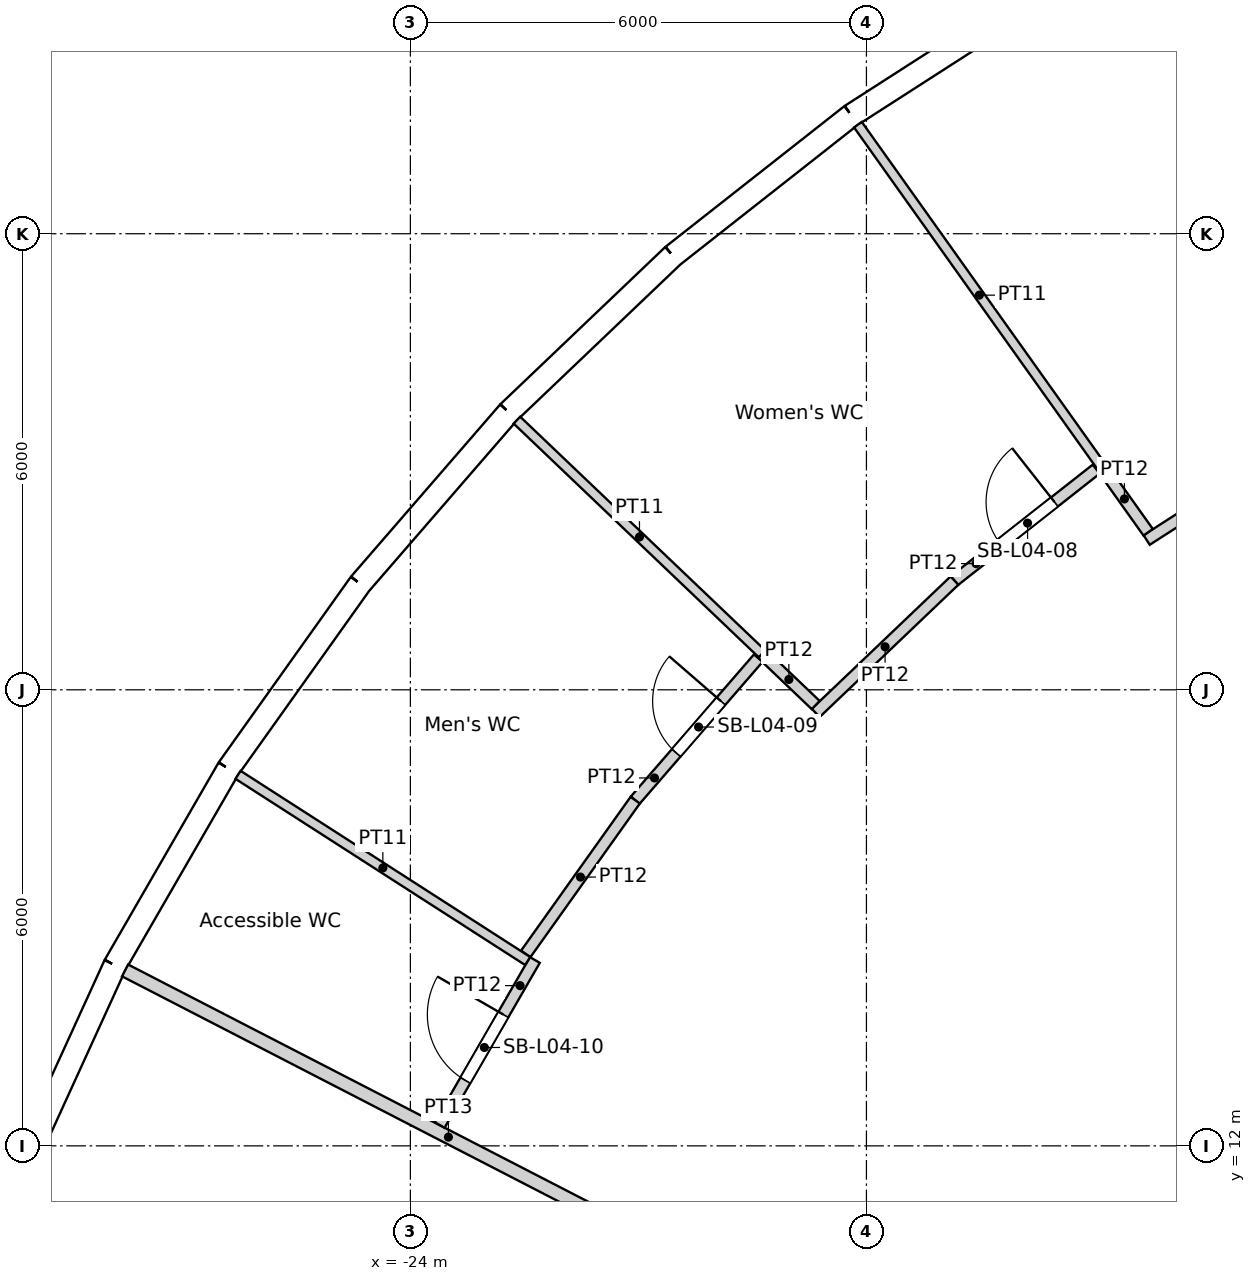
"""IFC4 building model, lengths in metres.
Left out: names, types, materials, properties, quantities, classifications, styles, units other than length and angle.
Written with IfcOpenShell. Run it as: python <this file> out.ifc"""

import sys

from ifc_helpers import new_model, si_unit, direction, frame, frame_2d, origin, origin_2d, place, context, subcontext, project, spatial, rectangle, circle, extrude, element, fill, save


model = new_model("IFC4")
c1 = context("Model", 3, precision=1e-05, world=origin(), true_north=direction((0.0, 1.0)))
c2 = subcontext(c1, "Body", "Model", "MODEL_VIEW")
j1 = project(units=[si_unit("LENGTHUNIT", "METRE"), si_unit("PLANEANGLEUNIT", "RADIAN")], contexts=[c1])
p1 = place(None, origin())
s1 = spatial("IfcSite", under=j1, at=p1, CompositionType="ELEMENT")
p2 = place(p1, origin())
s2 = spatial("IfcBuilding", under=s1, at=p2, CompositionType="ELEMENT")
p3 = place(p2, frame((0.0, 0.0, 23.4)))
s3 = spatial("IfcBuildingStorey", under=s2, at=p3, CompositionType="ELEMENT", Elevation=23.4)
for number, where, z_axis, x_axis in (
    (1, (-15.137, 26.219, 0.0), (0.0, 0.0, 1.0), (1.0, 0.0, 0.0)),
    (2, (-19.826, 22.88, 0.0), (0.0, 0.0, 1.0), (1.0, 0.0, 0.0)),
    (3, (-23.797, 18.715, 0.0), (0.0, 0.0, 1.0), (1.0, 0.0, 0.0)),
    (4, (-26.909, 13.873, 0.0), (0.0, 0.0, 1.0), (1.0, 0.0, 0.0)),
):
    element("IfcColumn", number, at=place(p3, frame(where, z_axis=z_axis, x_axis=x_axis)), inside=s3, PredefinedType="COLUMN", context=c2, shape_type="SweptSolid", body=[
        extrude(circle(Radius=0.7, at=origin_2d()), origin(), (0.0, 0.0, 1.0), 4.8),
    ])
for number, where, z_axis, x_axis in (
    (5, (-16.846, 17.855, 0.0), (0.0, 0.0, 1.0), (1.0, 0.0, 0.0)),
    (6, (-20.509, 13.489, 0.0), (0.0, 0.0, 1.0), (1.0, 0.0, 0.0)),
):
    element("IfcColumn", number, at=place(p3, frame(where, z_axis=z_axis, x_axis=x_axis)), inside=s3, PredefinedType="COLUMN", context=c2, shape_type="SweptSolid", body=[
        extrude(circle(Radius=0.75, at=origin_2d()), origin(), (0.0, 0.0, 1.0), 4.8),
    ])
p4 = place(p3, frame((-13.798, 12.802, 0.0), z_axis=(0.0, 0.0, 1.0), x_axis=(1.0, 0.0, 0.0)))
e7 = element("IfcColumn", 7, at=p4, inside=s3, PredefinedType="COLUMN", context=c2, shape_type="SweptSolid", body=[
    extrude(circle(Radius=0.8, at=origin_2d()), origin(), (0.0, 0.0, 1.0), 4.8),
])
p5 = place(p3, frame((-15.687, 27.171, 0.0), z_axis=(0.0, 0.0, 1.0), x_axis=(-0.841242231846, -0.540658401727, 0.0)))
e8 = element("IfcWall", 8, at=p5, inside=s3, PredefinedType="SOLIDWALL", context=c2, shape_type="SweptSolid", body=[
    extrude(rectangle(XDim=2.986, YDim=0.3, at=frame_2d((1.493, 0.0))), origin(), (0.0, 0.0, 1.0), 4.35),
])
p6 = place(p5, frame((1.493, 0.0, 2.0)))
e9 = element("IfcOpeningElement", 9, at=p6, cuts=e8, PredefinedType="OPENING", context=c2, shape_type="SweptSolid", body=[
    extrude(circle(Radius=1.2, at=origin_2d()), frame((0.0, 0.16, 0.0), z_axis=(0.0, -1.0, 0.0), x_axis=(1.0, 0.0, 0.0)), (0.0, 0.0, 1.0), 0.32),
])
p7 = place(p3, frame((-18.199, 25.557, 0.0), z_axis=(0.0, 0.0, 1.0), x_axis=(-0.786043032847, -0.618171780747, 0.0)))
e10 = element("IfcWall", 10, at=p7, inside=s3, PredefinedType="SOLIDWALL", context=c2, shape_type="SweptSolid", body=[
    extrude(rectangle(XDim=2.986, YDim=0.3, at=frame_2d((1.493, 0.0))), origin(), (0.0, 0.0, 1.0), 4.35),
])
p8 = place(p7, frame((1.493, 0.0, 2.0)))
e11 = element("IfcOpeningElement", 11, at=p8, cuts=e10, PredefinedType="OPENING", context=c2, shape_type="SweptSolid", body=[
    extrude(circle(Radius=1.2, at=origin_2d()), frame((0.0, 0.16, 0.0), z_axis=(0.0, -1.0, 0.0), x_axis=(1.0, 0.0, 0.0)), (0.0, 0.0, 1.0), 0.32),
])
p9 = place(p3, frame((-20.546, 23.711, 0.0), z_axis=(0.0, 0.0, 1.0), x_axis=(-0.723750841228, -0.690061388444, 0.0)))
e12 = element("IfcWall", 12, at=p9, inside=s3, PredefinedType="SOLIDWALL", context=c2, shape_type="SweptSolid", body=[
    extrude(rectangle(XDim=2.986, YDim=0.3, at=frame_2d((1.493, 0.0))), origin(), (0.0, 0.0, 1.0), 3.85),
])
p10 = place(p9, frame((1.493, 0.0, 2.0)))
e13 = element("IfcOpeningElement", 13, at=p10, cuts=e12, PredefinedType="OPENING", context=c2, shape_type="SweptSolid", body=[
    extrude(circle(Radius=1.2, at=origin_2d()), frame((0.0, 0.16, 0.0), z_axis=(0.0, -1.0, 0.0), x_axis=(1.0, 0.0, 0.0)), (0.0, 0.0, 1.0), 0.32),
])
p11 = place(p3, frame((-22.707, 21.651, 0.0), z_axis=(0.0, 0.0, 1.0), x_axis=(-0.654809121128, -0.755794294029, 0.0)))
e14 = element("IfcWall", 14, at=p11, inside=s3, PredefinedType="SOLIDWALL", context=c2, shape_type="SweptSolid", body=[
    extrude(rectangle(XDim=2.986, YDim=0.3, at=frame_2d((1.493, 0.0))), origin(), (0.0, 0.0, 1.0), 4.35),
])
p12 = place(p11, frame((1.493, 0.0, 2.0)))
e15 = element("IfcOpeningElement", 15, at=p12, cuts=e14, PredefinedType="OPENING", context=c2, shape_type="SweptSolid", body=[
    extrude(circle(Radius=1.2, at=origin_2d()), frame((0.0, 0.16, 0.0), z_axis=(0.0, -1.0, 0.0), x_axis=(1.0, 0.0, 0.0)), (0.0, 0.0, 1.0), 0.32),
])
p13 = place(p3, frame((-24.662, 19.394, 0.0), z_axis=(0.0, 0.0, 1.0), x_axis=(-0.580100533892, -0.814544885551, 0.0)))
e16 = element("IfcWall", 16, at=p13, inside=s3, PredefinedType="SOLIDWALL", context=c2, shape_type="SweptSolid", body=[
    extrude(rectangle(XDim=2.986, YDim=0.3, at=frame_2d((1.493, 0.0))), origin(), (0.0, 0.0, 1.0), 4.35),
])
p14 = place(p13, frame((1.493, 0.0, 2.0)))
e17 = element("IfcOpeningElement", 17, at=p14, cuts=e16, PredefinedType="OPENING", context=c2, shape_type="SweptSolid", body=[
    extrude(circle(Radius=1.2, at=origin_2d()), frame((0.0, 0.16, 0.0), z_axis=(0.0, -1.0, 0.0), x_axis=(1.0, 0.0, 0.0)), (0.0, 0.0, 1.0), 0.32),
])
p15 = place(p3, frame((-26.394, 16.962, 0.0), z_axis=(0.0, 0.0, 1.0), x_axis=(-0.500017373705, -0.866015372839, 0.0)))
e18 = element("IfcWall", 18, at=p15, inside=s3, PredefinedType="SOLIDWALL", context=c2, shape_type="SweptSolid", body=[
    extrude(rectangle(XDim=2.986, YDim=0.3, at=frame_2d((1.493, 0.0))), origin(), (0.0, 0.0, 1.0), 3.85),
])
p16 = place(p15, frame((1.493, 0.0, 2.0)))
e19 = element("IfcOpeningElement", 19, at=p16, cuts=e18, PredefinedType="OPENING", context=c2, shape_type="SweptSolid", body=[
    extrude(circle(Radius=1.2, at=origin_2d()), frame((0.0, 0.16, 0.0), z_axis=(0.0, -1.0, 0.0), x_axis=(1.0, 0.0, 0.0)), (0.0, 0.0, 1.0), 0.32),
])
p17 = place(p3, frame((-27.887, 14.377, 0.0), z_axis=(0.0, 0.0, 1.0), x_axis=(-0.415373250944, -0.909651066289, 0.0)))
e20 = element("IfcWall", 20, at=p17, inside=s3, PredefinedType="SOLIDWALL", context=c2, shape_type="SweptSolid", body=[
    extrude(rectangle(XDim=2.986, YDim=0.3, at=frame_2d((1.493, 0.0))), origin(), (0.0, 0.0, 1.0), 4.35),
])
p18 = place(p17, frame((1.493, 0.0, 2.0)))
e21 = element("IfcOpeningElement", 21, at=p18, cuts=e20, PredefinedType="OPENING", context=c2, shape_type="SweptSolid", body=[
    extrude(circle(Radius=1.2, at=origin_2d()), frame((0.0, 0.16, 0.0), z_axis=(0.0, -1.0, 0.0), x_axis=(1.0, 0.0, 0.0)), (0.0, 0.0, 1.0), 0.32),
])
p19 = place(p3, frame((-27.753, 14.308, 0.0), z_axis=(0.0, 0.0, 1.0), x_axis=(0.888834171956, -0.458228998169, 0.0)))
e22 = element("IfcWall", 22, at=p19, inside=s3, PredefinedType="PARTITIONING", context=c2, shape_type="SweptSolid", body=[
    extrude(rectangle(XDim=9.572, YDim=0.175, at=frame_2d((4.786, 0.0))), origin(), (0.0, 0.0, 1.0), 3.75),
])
p20 = place(p3, frame((-26.268, 16.881, 0.0), z_axis=(0.0, 0.0, 1.0), x_axis=(0.841252009565, -0.540643187697, 0.0)))
e23 = element("IfcWall", 23, at=p20, inside=s3, PredefinedType="PARTITIONING", context=c2, shape_type="SweptSolid", body=[
    extrude(rectangle(XDim=4.53, YDim=0.125, at=frame_2d((2.265, 0.0))), origin(), (0.0, 0.0, 1.0), 3.75),
])
p21 = place(p3, frame((-22.598, 21.547, 0.0), z_axis=(0.0, 0.0, 1.0), x_axis=(0.723757276148, -0.690054639302, 0.0)))
e24 = element("IfcWall", 24, at=p21, inside=s3, PredefinedType="PARTITIONING", context=c2, shape_type="SweptSolid", body=[
    extrude(rectangle(XDim=4.455, YDim=0.125, at=frame_2d((2.228, 0.0))), origin(), (0.0, 0.0, 1.0), 3.75),
])
p22 = place(p3, frame((-23.615, 12.275, 0.0), z_axis=(0.0, 0.0, 1.0), x_axis=(0.499952953824, 0.866052564203, 0.0)))
e25 = element("IfcWall", 25, at=p22, inside=s3, PredefinedType="PARTITIONING", context=c2, shape_type="SweptSolid", body=[
    extrude(rectangle(XDim=2.506, YDim=0.15, at=frame_2d((1.253, 0.0))), origin(), (0.0, 0.0, 1.0), 3.75),
])
p23 = place(p22, frame((0.677, 0.0, 0.0)))
e26 = element("IfcOpeningElement", 26, at=p23, cuts=e25, PredefinedType="OPENING", context=c2, shape_type="SweptSolid", body=[
    extrude(rectangle(XDim=1.0, YDim=2.1, at=frame_2d((0.5, 1.05))), frame((0.0, 0.075, 0.0), z_axis=(0.0, -1.0, 0.0), x_axis=(1.0, 0.0, 0.0)), (0.0, 0.0, 1.0), 0.15),
])
p24 = place(p3, frame((-21.042, 16.548, 0.0), z_axis=(0.0, 0.0, 1.0), x_axis=(-0.58007505892, -0.814563027653, 0.0)))
e27 = element("IfcWall", 27, at=p24, inside=s3, PredefinedType="PARTITIONING", context=c2, shape_type="SweptSolid", body=[
    extrude(rectangle(XDim=2.483, YDim=0.15, at=frame_2d((1.242, 0.0))), origin(), (0.0, 0.0, 1.0), 3.75),
])
p25 = place(p3, frame((-21.042, 16.548, 0.0), z_axis=(0.0, 0.0, 1.0), x_axis=(0.654791429376, 0.755809621542, 0.0)))
e28 = element("IfcWall", 28, at=p25, inside=s3, PredefinedType="PARTITIONING", context=c2, shape_type="SweptSolid", body=[
    extrude(rectangle(XDim=2.472, YDim=0.15, at=frame_2d((1.236, 0.0))), origin(), (0.0, 0.0, 1.0), 3.75),
])
p26 = place(p25, frame((0.824, 0.0, 0.0)))
e29 = element("IfcOpeningElement", 29, at=p26, cuts=e28, PredefinedType="OPENING", context=c2, shape_type="SweptSolid", body=[
    extrude(rectangle(XDim=0.9, YDim=2.1, at=frame_2d((0.45, 1.05))), frame((0.0, 0.075, 0.0), z_axis=(0.0, -1.0, 0.0), x_axis=(1.0, 0.0, 0.0)), (0.0, 0.0, 1.0), 0.15),
])
p27 = place(p3, frame((-19.374, 18.473, 0.0), z_axis=(0.0, 0.0, 1.0), x_axis=(0.723786925296, -0.690023540737, 0.0)))
e30 = element("IfcWall", 30, at=p27, inside=s3, PredefinedType="PARTITIONING", context=c2, shape_type="SweptSolid", body=[
    extrude(rectangle(XDim=0.976, YDim=0.15, at=frame_2d((0.488, 0.0))), origin(), (0.0, 0.0, 1.0), 3.75),
])
p28 = place(p3, frame((-18.112, 25.435, 0.0), z_axis=(0.0, 0.0, 1.0), x_axis=(0.580038022369, -0.814589401236, 0.0)))
e31 = element("IfcWall", 31, at=p28, inside=s3, PredefinedType="PARTITIONING", context=c2, shape_type="SweptSolid", body=[
    extrude(rectangle(XDim=5.506, YDim=0.125, at=frame_2d((2.753, 0.0))), origin(), (0.0, 0.0, 1.0), 3.75),
])
p29 = place(p3, frame((-16.842, 19.436, 0.0), z_axis=(0.0, 0.0, 1.0), x_axis=(-0.723748787545, -0.690063542384, 0.0)))
e32 = element("IfcWall", 32, at=p29, inside=s3, PredefinedType="PARTITIONING", context=c2, shape_type="SweptSolid", body=[
    extrude(rectangle(XDim=2.522, YDim=0.15, at=frame_2d((1.261, 0.0))), origin(), (0.0, 0.0, 1.0), 3.75),
])
p30 = place(p3, frame((-16.842, 19.436, 0.0), z_axis=(0.0, 0.0, 1.0), x_axis=(0.786071894696, 0.618135079387, 0.0)))
e33 = element("IfcWall", 33, at=p30, inside=s3, PredefinedType="PARTITIONING", context=c2, shape_type="SweptSolid", body=[
    extrude(rectangle(XDim=2.373, YDim=0.15, at=frame_2d((1.186, 0.0))), origin(), (0.0, 0.0, 1.0), 3.75),
])
p31 = place(p30, frame((0.774, 0.0, 0.0)))
e34 = element("IfcOpeningElement", 34, at=p31, cuts=e33, PredefinedType="OPENING", context=c2, shape_type="SweptSolid", body=[
    extrude(rectangle(XDim=0.9, YDim=2.1, at=frame_2d((0.45, 1.05))), frame((0.0, 0.075, 0.0), z_axis=(0.0, -1.0, 0.0), x_axis=(1.0, 0.0, 0.0)), (0.0, 0.0, 1.0), 0.15),
])
p32 = place(p3, frame((-14.918, 20.949, 0.0), z_axis=(0.0, 0.0, 1.0), x_axis=(0.580035908562, -0.814590906393, 0.0)))
e35 = element("IfcWall", 35, at=p32, inside=s3, PredefinedType="PARTITIONING", context=c2, shape_type="SweptSolid", body=[
    extrude(rectangle(XDim=1.076, YDim=0.15, at=frame_2d((0.538, 0.0))), origin(), (0.0, 0.0, 1.0), 3.75),
])
p33 = place(p3, frame((-12.283, 21.275, 0.0), z_axis=(0.0, 0.0, 1.0), x_axis=(-0.8412573693, -0.540634847747, 0.0)))
e36 = element("IfcWall", 36, at=p33, inside=s3, PredefinedType="PARTITIONING", context=c2, shape_type="SweptSolid", body=[
    extrude(rectangle(XDim=2.413, YDim=0.15, at=frame_2d((1.207, 0.0))), origin(), (0.0, 0.0, 1.0), 3.75),
])
p34 = place(p6, origin())
e37 = element("IfcWindow", 37, at=p34, inside=s3, PartitioningType="SINGLE_PANEL", PredefinedType="WINDOW", context=c2, shape_type="SweptSolid", body=[
    extrude(circle(Radius=1.2, at=origin_2d()), frame((0.0, 0.12, 0.0), z_axis=(0.0, -1.0, 0.0), x_axis=(1.0, 0.0, 0.0)), (0.0, 0.0, 1.0), 0.1),
])
fill(e9, e37)
p35 = place(p8, origin())
e38 = element("IfcWindow", 38, at=p35, inside=s3, PartitioningType="SINGLE_PANEL", PredefinedType="WINDOW", context=c2, shape_type="SweptSolid", body=[
    extrude(circle(Radius=1.2, at=origin_2d()), frame((0.0, 0.12, 0.0), z_axis=(0.0, -1.0, 0.0), x_axis=(1.0, 0.0, 0.0)), (0.0, 0.0, 1.0), 0.1),
])
fill(e11, e38)
p36 = place(p10, origin())
e39 = element("IfcWindow", 39, at=p36, inside=s3, PartitioningType="SINGLE_PANEL", PredefinedType="WINDOW", context=c2, shape_type="SweptSolid", body=[
    extrude(circle(Radius=1.2, at=origin_2d()), frame((0.0, 0.12, 0.0), z_axis=(0.0, -1.0, 0.0), x_axis=(1.0, 0.0, 0.0)), (0.0, 0.0, 1.0), 0.1),
])
fill(e13, e39)
p37 = place(p12, origin())
e40 = element("IfcWindow", 40, at=p37, inside=s3, PartitioningType="SINGLE_PANEL", PredefinedType="WINDOW", context=c2, shape_type="SweptSolid", body=[
    extrude(circle(Radius=1.2, at=origin_2d()), frame((0.0, 0.12, 0.0), z_axis=(0.0, -1.0, 0.0), x_axis=(1.0, 0.0, 0.0)), (0.0, 0.0, 1.0), 0.1),
])
fill(e15, e40)
p38 = place(p14, origin())
e41 = element("IfcWindow", 41, at=p38, inside=s3, PartitioningType="SINGLE_PANEL", PredefinedType="WINDOW", context=c2, shape_type="SweptSolid", body=[
    extrude(circle(Radius=1.2, at=origin_2d()), frame((0.0, 0.12, 0.0), z_axis=(0.0, -1.0, 0.0), x_axis=(1.0, 0.0, 0.0)), (0.0, 0.0, 1.0), 0.1),
])
fill(e17, e41)
p39 = place(p16, origin())
e42 = element("IfcWindow", 42, at=p39, inside=s3, PartitioningType="SINGLE_PANEL", PredefinedType="WINDOW", context=c2, shape_type="SweptSolid", body=[
    extrude(circle(Radius=1.2, at=origin_2d()), frame((0.0, 0.12, 0.0), z_axis=(0.0, -1.0, 0.0), x_axis=(1.0, 0.0, 0.0)), (0.0, 0.0, 1.0), 0.1),
])
fill(e19, e42)
p40 = place(p18, origin())
e43 = element("IfcWindow", 43, at=p40, inside=s3, PartitioningType="SINGLE_PANEL", PredefinedType="WINDOW", context=c2, shape_type="SweptSolid", body=[
    extrude(circle(Radius=1.2, at=origin_2d()), frame((0.0, 0.12, 0.0), z_axis=(0.0, -1.0, 0.0), x_axis=(1.0, 0.0, 0.0)), (0.0, 0.0, 1.0), 0.1),
])
fill(e21, e43)
p41 = place(p31, origin())
e44 = element("IfcDoor", 44, at=p41, inside=s3, OperationType="SINGLE_SWING_RIGHT", PredefinedType="DOOR", context=c2, shape_type="SweptSolid", body=[
    extrude(rectangle(XDim=0.9, YDim=2.1, at=frame_2d((0.45, 1.05))), frame((0.0, 0.025, 0.0), z_axis=(0.0, -1.0, 0.0), x_axis=(1.0, 0.0, 0.0)), (0.0, 0.0, 1.0), 0.05),
])
fill(e34, e44)
p42 = place(p26, origin())
e45 = element("IfcDoor", 45, at=p42, inside=s3, OperationType="SINGLE_SWING_RIGHT", PredefinedType="DOOR", context=c2, shape_type="SweptSolid", body=[
    extrude(rectangle(XDim=0.9, YDim=2.1, at=frame_2d((0.45, 1.05))), frame((0.0, 0.025, 0.0), z_axis=(0.0, -1.0, 0.0), x_axis=(1.0, 0.0, 0.0)), (0.0, 0.0, 1.0), 0.05),
])
fill(e29, e45)
p43 = place(p23, origin())
e46 = element("IfcDoor", 46, at=p43, inside=s3, OperationType="SINGLE_SWING_RIGHT", PredefinedType="DOOR", context=c2, shape_type="SweptSolid", body=[
    extrude(rectangle(XDim=1.0, YDim=2.1, at=frame_2d((0.5, 1.05))), frame((0.0, 0.025, 0.0), z_axis=(0.0, -1.0, 0.0), x_axis=(1.0, 0.0, 0.0)), (0.0, 0.0, 1.0), 0.05),
])
fill(e26, e46)
save(model, sys.argv[1])
